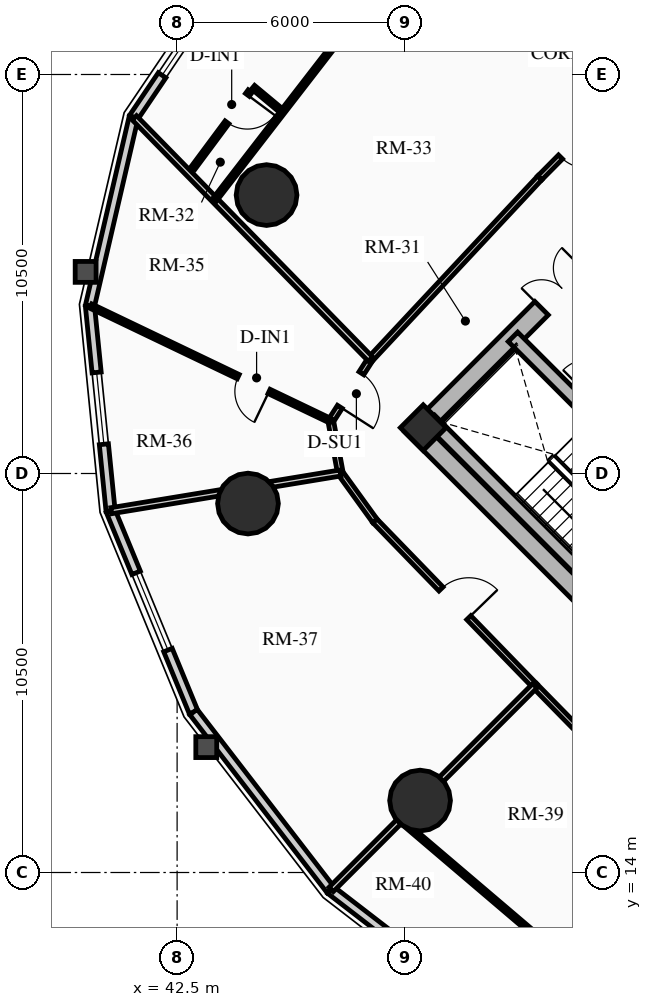
"""IFC4 building model, lengths in metres.
Left out: names, types, materials, properties, quantities, classifications, styles, units other than length and angle.
Written with IfcOpenShell. Run it as: python <this file> out.ifc"""

import sys

from ifc_helpers import new_model, si_unit, direction, frame, frame_2d, origin, origin_2d, place, context, subcontext, project, spatial, rectangle, circle, extrude, source, transform, mapped, element, fill, save


model = new_model("IFC4")
c1 = context("Model", 3, precision=1e-05, world=origin(), true_north=direction((0.0, 1.0)))
c2 = subcontext(c1, "Body", "Model", "MODEL_VIEW")
j1 = project(units=[si_unit("LENGTHUNIT", "METRE"), si_unit("PLANEANGLEUNIT", "RADIAN")], contexts=[c1])
p1 = place(None, origin())
s1 = spatial("IfcSite", under=j1, at=p1, CompositionType="ELEMENT")
p2 = place(p1, origin())
s2 = spatial("IfcBuilding", under=s1, at=p2, CompositionType="ELEMENT")
p3 = place(p2, frame((0.0, 0.0, 45.28)))
s3 = spatial("IfcBuildingStorey", under=s2, at=p3, CompositionType="ELEMENT", Elevation=45.28)
p4 = place(p3, frame((58.773, 15.661, 0.0), z_axis=(0.0, 0.0, 1.0), x_axis=(-0.707106781187, 0.707106781187, 0.0)))
e1 = element("IfcWall", 1, at=p4, inside=s3, PredefinedType="SHEAR", context=c2, shape_type="SweptSolid", body=[
    extrude(rectangle(XDim=14.3, YDim=0.5, at=frame_2d((7.15, 0.0))), origin(), (0.0, 0.0, 1.0), 2.91),
])
p5 = place(p3, frame((48.838, 25.596, 0.0), z_axis=(0.0, 0.0, 1.0), x_axis=(0.707106781187, 0.707106781187, 0.0)))
e2 = element("IfcWall", 2, at=p5, inside=s3, PredefinedType="SHEAR", context=c2, shape_type="SweptSolid", body=[
    extrude(rectangle(XDim=10.7, YDim=0.5, at=frame_2d((5.35, 0.0))), origin(), (0.0, 0.0, 1.0), 2.91),
])
m1 = source(origin(), c2, "Body", "SweptSolid", [
    extrude(rectangle(XDim=1.5, YDim=2.02, at=frame_2d((0.75, 1.01))), frame((0.0, 0.26, 0.0), z_axis=(0.0, -1.0, 0.0), x_axis=(1.0, 0.0, 0.0)), (0.0, 0.0, 1.0), 0.52),
])
p6 = place(p5, frame((4.6, 0.0, 0.0)))
e3 = element("IfcOpeningElement", 3, at=p6, cuts=e2, PredefinedType="OPENING", context=c2, shape_type="MappedRepresentation", body=[
    mapped(m1, transform((0.0, 0.0, 0.0), x_axis=(1.0, 0.0, 0.0), y_axis=(0.0, 1.0, 0.0), z_axis=(0.0, 0.0, 1.0), scale=1.0)),
])
p7 = place(p3, frame((61.096, 18.338, 0.0), z_axis=(0.0, 0.0, 1.0), x_axis=(-0.707106781187, 0.707106781187, 0.0)))
e4 = element("IfcWall", 4, at=p7, inside=s3, PredefinedType="SHEAR", context=c2, shape_type="SweptSolid", body=[
    extrude(rectangle(XDim=13.8, YDim=0.35, at=frame_2d((6.9, 0.0))), origin(), (0.0, 0.0, 1.0), 2.91),
])
m2 = source(origin(), c2, "Body", "SweptSolid", [
    extrude(rectangle(XDim=1.1, YDim=2.015, at=frame_2d((0.55, 1.007))), frame((0.0, 0.185, 0.0), z_axis=(0.0, -1.0, 0.0), x_axis=(1.0, 0.0, 0.0)), (0.0, 0.0, 1.0), 0.37),
])
p8 = place(p7, frame((4.9, 0.0, 0.0)))
e5 = element("IfcOpeningElement", 5, at=p8, cuts=e4, PredefinedType="OPENING", context=c2, shape_type="MappedRepresentation", body=[
    mapped(m2, transform((0.0, 0.0, 0.0), x_axis=(1.0, 0.0, 0.0), y_axis=(0.0, 1.0, 0.0), z_axis=(0.0, 0.0, 1.0), scale=1.0)),
])
m3 = source(origin(), c2, "Body", "SweptSolid", [
    extrude(rectangle(XDim=1.15, YDim=2.02, at=frame_2d((0.575, 1.01))), frame((0.0, 0.185, 0.0), z_axis=(0.0, -1.0, 0.0), x_axis=(1.0, 0.0, 0.0)), (0.0, 0.0, 1.0), 0.37),
])
p9 = place(p7, frame((7.32, 0.0, 0.0)))
e6 = element("IfcOpeningElement", 6, at=p9, cuts=e4, PredefinedType="OPENING", context=c2, shape_type="MappedRepresentation", body=[
    mapped(m3, transform((0.0, 0.0, 0.0), x_axis=(1.0, 0.0, 0.0), y_axis=(0.0, 1.0, 0.0), z_axis=(0.0, 0.0, 1.0), scale=1.0)),
])
p10 = place(p3, frame((53.922, 21.141, 0.0), z_axis=(0.0, 0.0, 1.0), x_axis=(-0.707106781187, 0.707106781187, 0.0)))
e7 = element("IfcWall", 7, at=p10, inside=s3, PredefinedType="SHEAR", context=c2, shape_type="SweptSolid", body=[
    extrude(rectangle(XDim=6.745, YDim=0.35, at=frame_2d((3.373, 0.0))), origin(), (0.0, 0.0, 1.0), 2.91),
])
p11 = place(p3, frame((48.976, 25.706, 0.0), z_axis=(0.0, 0.0, 1.0), x_axis=(0.707106781187, 0.707106781187, 0.0)))
e8 = element("IfcColumn", 8, at=p11, inside=s3, PredefinedType="COLUMN", context=c2, shape_type="SweptSolid", body=[
    extrude(rectangle(XDim=0.85, YDim=0.85, at=origin_2d()), origin(), (0.0, 0.0, 1.0), 2.91),
])
for number, where, z_axis, x_axis in (
    (9, (44.854, 31.827, 0.0), (0.0, 0.0, 1.0), (1.0, 0.0, 0.0)),
    (10, (44.365, 23.709, 0.0), (0.0, 0.0, 1.0), (1.0, 0.0, 0.0)),
    (11, (48.893, 15.893, 0.0), (0.0, 0.0, 1.0), (1.0, 0.0, 0.0)),
):
    element("IfcColumn", number, at=place(p3, frame(where, z_axis=z_axis, x_axis=x_axis)), inside=s3, PredefinedType="USERDEFINED", context=c2, shape_type="SweptSolid", body=[
        extrude(circle(Radius=0.8, at=origin_2d()), origin(), (0.0, 0.0, 1.0), 2.91),
    ])
p12 = place(p3, frame((41.356, 33.871, 0.0), z_axis=(0.0, 0.0, 1.0), x_axis=(0.559621532896, 0.828748297084, 0.0)))
e12 = element("IfcWall", 12, at=p12, inside=s3, PredefinedType="SOLIDWALL", context=c2, shape_type="SweptSolid", body=[
    extrude(rectangle(XDim=4.879, YDim=0.24, at=frame_2d((2.439, 0.0))), origin(), (0.0, 0.0, 1.0), 2.073),
])
m4 = source(origin(), c2, "Body", "SweptSolid", [
    extrude(rectangle(XDim=2.2, YDim=1.35, at=frame_2d((1.1, 0.675))), frame((0.0, 0.13, 0.0), z_axis=(0.0, -1.0, 0.0), x_axis=(1.0, 0.0, 0.0)), (0.0, 0.0, 1.0), 0.26),
])
p13 = place(p12, frame((1.339, 0.0, 0.65)))
e13 = element("IfcOpeningElement", 13, at=p13, cuts=e12, PredefinedType="OPENING", context=c2, shape_type="MappedRepresentation", body=[
    mapped(m4, transform((0.0, 0.0, 0.0), x_axis=(1.0, 0.0, 0.0), y_axis=(0.0, 1.0, 0.0), z_axis=(0.0, 0.0, 1.0), scale=1.0)),
])
p14 = place(p3, frame((40.206, 28.91, 0.0), z_axis=(0.0, 0.0, 1.0), x_axis=(0.22582585901, 0.974167686491, 0.0)))
e14 = element("IfcWall", 14, at=p14, inside=s3, PredefinedType="SOLIDWALL", context=c2, shape_type="SweptSolid", body=[
    extrude(rectangle(XDim=5.092, YDim=0.24, at=frame_2d((2.546, 0.0))), origin(), (0.0, 0.0, 1.0), 2.073),
])
p15 = place(p3, frame((40.749, 23.518, 0.0), z_axis=(0.0, 0.0, 1.0), x_axis=(-0.100190592135, 0.994968263437, 0.0)))
e15 = element("IfcWall", 15, at=p15, inside=s3, PredefinedType="SOLIDWALL", context=c2, shape_type="SweptSolid", body=[
    extrude(rectangle(XDim=5.419, YDim=0.24, at=frame_2d((2.71, 0.0))), origin(), (0.0, 0.0, 1.0), 2.073),
])
m5 = source(origin(), c2, "Body", "SweptSolid", [
    extrude(rectangle(XDim=1.9, YDim=1.35, at=frame_2d((0.95, 0.675))), frame((0.0, 0.13, 0.0), z_axis=(0.0, -1.0, 0.0), x_axis=(1.0, 0.0, 0.0)), (0.0, 0.0, 1.0), 0.26),
])
p16 = place(p15, frame((1.76, 0.0, 0.65)))
e16 = element("IfcOpeningElement", 16, at=p16, cuts=e15, PredefinedType="OPENING", context=c2, shape_type="MappedRepresentation", body=[
    mapped(m5, transform((0.0, 0.0, 0.0), x_axis=(1.0, 0.0, 0.0), y_axis=(0.0, 1.0, 0.0), z_axis=(0.0, 0.0, 1.0), scale=1.0)),
])
p17 = place(p3, frame((42.932, 18.222, 0.0), z_axis=(0.0, 0.0, 1.0), x_axis=(-0.381077764176, 0.924542988536, 0.0)))
e17 = element("IfcWall", 17, at=p17, inside=s3, PredefinedType="SOLIDWALL", context=c2, shape_type="SweptSolid", body=[
    extrude(rectangle(XDim=5.728, YDim=0.24, at=frame_2d((2.864, 0.0))), origin(), (0.0, 0.0, 1.0), 2.073),
])
p18 = place(p17, frame((1.764, 0.0, 0.65)))
e18 = element("IfcOpeningElement", 18, at=p18, cuts=e17, PredefinedType="OPENING", context=c2, shape_type="MappedRepresentation", body=[
    mapped(m4, transform((0.0, 0.0, 0.0), x_axis=(1.0, 0.0, 0.0), y_axis=(0.0, 1.0, 0.0), z_axis=(0.0, 0.0, 1.0), scale=1.0)),
])
p19 = place(p3, frame((46.541, 13.541, 0.0), z_axis=(0.0, 0.0, 1.0), x_axis=(-0.610494906082, 0.792020182601, 0.0)))
e19 = element("IfcWall", 19, at=p19, inside=s3, PredefinedType="SOLIDWALL", context=c2, shape_type="SweptSolid", body=[
    extrude(rectangle(XDim=5.911, YDim=0.24, at=frame_2d((2.956, 0.0))), origin(), (0.0, 0.0, 1.0), 2.073),
])
p20 = place(p3, frame((51.222, 9.932, 0.0), z_axis=(0.0, 0.0, 1.0), x_axis=(-0.792020182601, 0.610494906082, 0.0)))
e20 = element("IfcWall", 20, at=p20, inside=s3, PredefinedType="SOLIDWALL", context=c2, shape_type="SweptSolid", body=[
    extrude(rectangle(XDim=5.911, YDim=0.24, at=frame_2d((2.956, 0.0))), origin(), (0.0, 0.0, 1.0), 2.073),
])
p21 = place(p20, frame((2.005, 0.0, 0.65)))
e21 = element("IfcOpeningElement", 21, at=p21, cuts=e20, PredefinedType="OPENING", context=c2, shape_type="MappedRepresentation", body=[
    mapped(m5, transform((0.0, 0.0, 0.0), x_axis=(1.0, 0.0, 0.0), y_axis=(0.0, 1.0, 0.0), z_axis=(0.0, 0.0, 1.0), scale=1.0)),
])
p22 = place(p3, frame((54.427, 34.683, 0.0), z_axis=(0.0, 0.0, 1.0), x_axis=(-0.704178989986, -0.710022499687, 0.0)))
e22 = element("IfcWall", 22, at=p22, inside=s3, PredefinedType="PARTITIONING", context=c2, shape_type="SweptSolid", body=[
    extrude(rectangle(XDim=3.384, YDim=0.15, at=frame_2d((1.692, 0.0))), origin(), (0.0, 0.0, 1.0), 2.159),
])
m6 = source(origin(), c2, "Body", "SweptSolid", [
    extrude(rectangle(XDim=1.05, YDim=2.015, at=frame_2d((0.525, 1.007))), frame((0.0, 0.085, 0.0), z_axis=(0.0, -1.0, 0.0), x_axis=(1.0, 0.0, 0.0)), (0.0, 0.0, 1.0), 0.17),
])
p23 = place(p22, frame((1.56, 0.0, 0.0)))
e23 = element("IfcOpeningElement", 23, at=p23, cuts=e22, PredefinedType="OPENING", context=c2, shape_type="MappedRepresentation", body=[
    mapped(m6, transform((0.0, 0.0, 0.0), x_axis=(1.0, 0.0, 0.0), y_axis=(0.0, 1.0, 0.0), z_axis=(0.0, 0.0, 1.0), scale=1.0)),
])
p24 = place(p3, frame((52.043, 32.28, 0.0), z_axis=(0.0, 0.0, 1.0), x_axis=(-0.682606081633, -0.730786519661, 0.0)))
e24 = element("IfcWall", 24, at=p24, inside=s3, PredefinedType="PARTITIONING", context=c2, shape_type="SweptSolid", body=[
    extrude(rectangle(XDim=6.527, YDim=0.15, at=frame_2d((3.263, 0.0))), origin(), (0.0, 0.0, 1.0), 2.159),
])
p25 = place(p3, frame((47.588, 27.51, 0.0), z_axis=(0.0, 0.0, 1.0), x_axis=(-0.540202619347, -0.841534984449, 0.0)))
e25 = element("IfcWall", 25, at=p25, inside=s3, PredefinedType="PARTITIONING", context=c2, shape_type="SweptSolid", body=[
    extrude(rectangle(XDim=1.935, YDim=0.15, at=frame_2d((0.967, 0.0))), origin(), (0.0, 0.0, 1.0), 2.159),
])
p26 = place(p25, frame((0.442, 0.0, 0.0)))
e26 = element("IfcOpeningElement", 26, at=p26, cuts=e25, PredefinedType="OPENING", context=c2, shape_type="MappedRepresentation", body=[
    mapped(m6, transform((0.0, 0.0, 0.0), x_axis=(1.0, 0.0, 0.0), y_axis=(0.0, 1.0, 0.0), z_axis=(0.0, 0.0, 1.0), scale=1.0)),
])
p27 = place(p3, frame((46.543, 25.882, 0.0), z_axis=(0.0, 0.0, 1.0), x_axis=(0.181153502579, -0.983454832976, 0.0)))
e27 = element("IfcWall", 27, at=p27, inside=s3, PredefinedType="PARTITIONING", context=c2, shape_type="SweptSolid", body=[
    extrude(rectangle(XDim=1.392, YDim=0.15, at=frame_2d((0.696, 0.0))), origin(), (0.0, 0.0, 1.0), 2.159),
])
p28 = place(p3, frame((46.795, 24.513, 0.0), z_axis=(0.0, 0.0, 1.0), x_axis=(0.585628197524, -0.810579801294, 0.0)))
e28 = element("IfcWall", 28, at=p28, inside=s3, PredefinedType="PARTITIONING", context=c2, shape_type="SweptSolid", body=[
    extrude(rectangle(XDim=1.554, YDim=0.15, at=frame_2d((0.777, 0.0))), origin(), (0.0, 0.0, 1.0), 2.205),
])
p29 = place(p3, frame((47.706, 23.253, 0.0), z_axis=(0.0, 0.0, 1.0), x_axis=(0.696179266346, -0.717867974707, 0.0)))
e29 = element("IfcWall", 29, at=p29, inside=s3, PredefinedType="PARTITIONING", context=c2, shape_type="SweptSolid", body=[
    extrude(rectangle(XDim=6.045, YDim=0.15, at=frame_2d((3.022, 0.0))), origin(), (0.0, 0.0, 1.0), 2.635),
])
p30 = place(p29, frame((2.497, 0.0, 0.0)))
e30 = element("IfcOpeningElement", 30, at=p30, cuts=e29, PredefinedType="OPENING", context=c2, shape_type="MappedRepresentation", body=[
    mapped(m6, transform((0.0, 0.0, 0.0), x_axis=(1.0, 0.0, 0.0), y_axis=(0.0, 1.0, 0.0), z_axis=(0.0, 0.0, 1.0), scale=1.0)),
])
p31 = place(p3, frame((51.914, 18.914, 0.0), z_axis=(0.0, 0.0, 1.0), x_axis=(0.699999313799, -0.714143515465, 0.0)))
e31 = element("IfcWall", 31, at=p31, inside=s3, PredefinedType="PARTITIONING", context=c2, shape_type="SweptSolid", body=[
    extrude(rectangle(XDim=6.162, YDim=0.15, at=frame_2d((3.081, 0.0))), origin(), (0.0, 0.0, 1.0), 2.159),
])
p32 = place(p3, frame((47.588, 27.51, 0.0), z_axis=(0.0, 0.0, 1.0), x_axis=(-0.699371977892, 0.714757886657, 0.0)))
e32 = element("IfcWall", 32, at=p32, inside=s3, PredefinedType="PARTITIONING", context=c2, shape_type="SweptSolid", body=[
    extrude(rectangle(XDim=8.886, YDim=0.16, at=frame_2d((4.443, 0.0))), origin(), (0.0, 0.0, 1.0), 2.073),
])
p33 = place(p3, frame((46.795, 24.513, 0.0), z_axis=(0.0, 0.0, 1.0), x_axis=(-0.986729986004, -0.162369746937, 0.0)))
e33 = element("IfcWall", 33, at=p33, inside=s3, PredefinedType="PARTITIONING", context=c2, shape_type="SweptSolid", body=[
    extrude(rectangle(XDim=6.108, YDim=0.16, at=frame_2d((3.054, 0.0))), origin(), (0.0, 0.0, 1.0), 2.073),
])
p34 = place(p3, frame((51.914, 18.914, 0.0), z_axis=(0.0, 0.0, 1.0), x_axis=(-0.707106781187, -0.707106781187, 0.0)))
e34 = element("IfcWall", 34, at=p34, inside=s3, PredefinedType="PARTITIONING", context=c2, shape_type="SweptSolid", body=[
    extrude(rectangle(XDim=7.579, YDim=0.16, at=frame_2d((3.79, 0.0))), origin(), (0.0, 0.0, 1.0), 2.073),
])
p35 = place(p3, frame((46.801, 35.989, 0.0), z_axis=(0.0, 0.0, 1.0), x_axis=(-0.611635984749, -0.791139319058, 0.0)))
e35 = element("IfcWall", 35, at=p35, inside=s3, PredefinedType="PARTITIONING", context=c2, shape_type="SweptSolid", body=[
    extrude(rectangle(XDim=5.419, YDim=0.125, at=frame_2d((2.709, 0.0))), origin(), (0.0, 0.0, 1.0), 2.159),
])
p36 = place(p3, frame((45.204, 34.078, 0.0), z_axis=(0.0, 0.0, 1.0), x_axis=(-0.768330339969, 0.640053504547, 0.0)))
e36 = element("IfcWall", 36, at=p36, inside=s3, PredefinedType="PARTITIONING", context=c2, shape_type="SweptSolid", body=[
    extrude(rectangle(XDim=0.917, YDim=0.125, at=frame_2d((0.458, 0.0))), origin(), (0.0, 0.0, 1.0), 2.635),
])
p37 = place(p3, frame((44.421, 34.56, 0.0), z_axis=(0.0, 0.0, 1.0), x_axis=(-0.596454407051, -0.802646958699, 0.0)))
e37 = element("IfcWall", 37, at=p37, inside=s3, PredefinedType="PARTITIONING", context=c2, shape_type="SweptSolid", body=[
    extrude(rectangle(XDim=2.516, YDim=0.125, at=frame_2d((1.258, 0.0))), origin(), (0.0, 0.0, 1.0), 2.159),
])
m7 = source(origin(), c2, "Body", "SweptSolid", [
    extrude(rectangle(XDim=0.9, YDim=2.005, at=frame_2d((0.45, 1.002))), frame((0.0, 0.073, 0.0), z_axis=(0.0, -1.0, 0.0), x_axis=(1.0, 0.0, 0.0)), (0.0, 0.0, 1.0), 0.145),
])
p38 = place(p37, frame((0.12, 0.0, 0.0)))
e38 = element("IfcOpeningElement", 38, at=p38, cuts=e37, PredefinedType="OPENING", context=c2, shape_type="MappedRepresentation", body=[
    mapped(m7, transform((0.0, 0.0, 0.0), x_axis=(1.0, 0.0, 0.0), y_axis=(0.0, 1.0, 0.0), z_axis=(0.0, 0.0, 1.0), scale=1.0)),
])
p39 = place(p3, frame((46.543, 25.882, 0.0), z_axis=(0.0, 0.0, 1.0), x_axis=(-0.901937110034, 0.431867398103, 0.0)))
e39 = element("IfcWall", 39, at=p39, inside=s3, PredefinedType="PARTITIONING", context=c2, shape_type="SweptSolid", body=[
    extrude(rectangle(XDim=7.004, YDim=0.125, at=frame_2d((3.502, 0.0))), origin(), (0.0, 0.0, 1.0), 2.073),
])
p40 = place(p39, frame((1.8, 0.0, 0.0)))
e40 = element("IfcOpeningElement", 40, at=p40, cuts=e39, PredefinedType="OPENING", context=c2, shape_type="MappedRepresentation", body=[
    mapped(m7, transform((0.0, 0.0, 0.0), x_axis=(1.0, 0.0, 0.0), y_axis=(0.0, 1.0, 0.0), z_axis=(0.0, 0.0, 1.0), scale=1.0)),
])
p41 = place(p3, frame((48.377, 15.377, 0.0), z_axis=(0.0, 0.0, 1.0), x_axis=(0.761505943152, -0.648157927163, 0.0)))
e41 = element("IfcWall", 41, at=p41, inside=s3, PredefinedType="PARTITIONING", context=c2, shape_type="SweptSolid", body=[
    extrude(rectangle(XDim=5.979, YDim=0.125, at=frame_2d((2.99, 0.0))), origin(), (0.0, 0.0, 1.0), 2.635),
])
m8 = source(origin(), c2, "Body", "SweptSolid", [
    extrude(rectangle(XDim=2.2, YDim=1.35, at=frame_2d((1.1, 0.675))), frame((0.0, 0.03, 0.0), z_axis=(0.0, -1.0, 0.0), x_axis=(1.0, 0.0, 0.0)), (0.0, 0.0, 1.0), 0.06),
])
p42 = place(p13, origin())
e42 = element("IfcWindow", 42, at=p42, inside=s3, PartitioningType="DOUBLE_PANEL_VERTICAL", PredefinedType="WINDOW", context=c2, shape_type="MappedRepresentation", body=[
    mapped(m8, transform((0.0, 0.0, 0.0), x_axis=(1.0, 0.0, 0.0), y_axis=(0.0, 1.0, 0.0), z_axis=(0.0, 0.0, 1.0), scale=1.0)),
])
fill(e13, e42)
m9 = source(origin(), c2, "Body", "SweptSolid", [
    extrude(rectangle(XDim=1.9, YDim=1.35, at=frame_2d((0.95, 0.675))), frame((0.0, 0.03, 0.0), z_axis=(0.0, -1.0, 0.0), x_axis=(1.0, 0.0, 0.0)), (0.0, 0.0, 1.0), 0.06),
])
p43 = place(p16, origin())
e43 = element("IfcWindow", 43, at=p43, inside=s3, PartitioningType="DOUBLE_PANEL_VERTICAL", PredefinedType="WINDOW", context=c2, shape_type="MappedRepresentation", body=[
    mapped(m9, transform((0.0, 0.0, 0.0), x_axis=(1.0, 0.0, 0.0), y_axis=(0.0, 1.0, 0.0), z_axis=(0.0, 0.0, 1.0), scale=1.0)),
])
fill(e16, e43)
p44 = place(p18, origin())
e44 = element("IfcWindow", 44, at=p44, inside=s3, PartitioningType="DOUBLE_PANEL_VERTICAL", PredefinedType="WINDOW", context=c2, shape_type="MappedRepresentation", body=[
    mapped(m8, transform((0.0, 0.0, 0.0), x_axis=(1.0, 0.0, 0.0), y_axis=(0.0, 1.0, 0.0), z_axis=(0.0, 0.0, 1.0), scale=1.0)),
])
fill(e18, e44)
m10 = source(origin(), c2, "Body", "SweptSolid", [
    extrude(rectangle(XDim=1.5, YDim=2.02, at=frame_2d((0.75, 1.01))), frame((0.0, 0.025, 0.0), z_axis=(0.0, -1.0, 0.0), x_axis=(1.0, 0.0, 0.0)), (0.0, 0.0, 1.0), 0.05),
])
p45 = place(p6, origin())
e45 = element("IfcDoor", 45, at=p45, inside=s3, OperationType="DOUBLE_DOOR_SINGLE_SWING", PredefinedType="DOOR", context=c2, shape_type="MappedRepresentation", body=[
    mapped(m10, transform((0.0, 0.0, 0.0), x_axis=(1.0, 0.0, 0.0), y_axis=(0.0, 1.0, 0.0), z_axis=(0.0, 0.0, 1.0), scale=1.0)),
])
fill(e3, e45)
m11 = source(origin(), c2, "Body", "SweptSolid", [
    extrude(rectangle(XDim=1.05, YDim=2.015, at=frame_2d((0.525, 1.007))), frame((0.0, 0.025, 0.0), z_axis=(0.0, -1.0, 0.0), x_axis=(1.0, 0.0, 0.0)), (0.0, 0.0, 1.0), 0.05),
])
p46 = place(p23, origin())
e46 = element("IfcDoor", 46, at=p46, inside=s3, OperationType="SINGLE_SWING_LEFT", PredefinedType="DOOR", context=c2, shape_type="MappedRepresentation", body=[
    mapped(m11, transform((0.0, 0.0, 0.0), x_axis=(1.0, 0.0, 0.0), y_axis=(0.0, 1.0, 0.0), z_axis=(0.0, 0.0, 1.0), scale=1.0)),
])
fill(e23, e46)
m12 = source(origin(), c2, "Body", "SweptSolid", [
    extrude(rectangle(XDim=0.9, YDim=2.005, at=frame_2d((0.45, 1.002))), frame((0.0, 0.025, 0.0), z_axis=(0.0, -1.0, 0.0), x_axis=(1.0, 0.0, 0.0)), (0.0, 0.0, 1.0), 0.05),
])
p47 = place(p38, origin())
e47 = element("IfcDoor", 47, at=p47, inside=s3, OperationType="SINGLE_SWING_LEFT", PredefinedType="DOOR", context=c2, shape_type="MappedRepresentation", body=[
    mapped(m12, transform((0.0, 0.0, 0.0), x_axis=(1.0, 0.0, 0.0), y_axis=(0.0, 1.0, 0.0), z_axis=(0.0, 0.0, 1.0), scale=1.0)),
])
fill(e38, e47)
p48 = place(p26, origin())
e48 = element("IfcDoor", 48, at=p48, inside=s3, OperationType="SINGLE_SWING_RIGHT", PredefinedType="DOOR", context=c2, shape_type="MappedRepresentation", body=[
    mapped(m11, transform((0.0, 0.0, 0.0), x_axis=(1.0, 0.0, 0.0), y_axis=(0.0, 1.0, 0.0), z_axis=(0.0, 0.0, 1.0), scale=1.0)),
])
fill(e26, e48)
p49 = place(p40, origin())
e49 = element("IfcDoor", 49, at=p49, inside=s3, OperationType="SINGLE_SWING_LEFT", PredefinedType="DOOR", context=c2, shape_type="MappedRepresentation", body=[
    mapped(m12, transform((0.0, 0.0, 0.0), x_axis=(1.0, 0.0, 0.0), y_axis=(0.0, 1.0, 0.0), z_axis=(0.0, 0.0, 1.0), scale=1.0)),
])
fill(e40, e49)
p50 = place(p30, origin())
e50 = element("IfcDoor", 50, at=p50, inside=s3, OperationType="SINGLE_SWING_RIGHT", PredefinedType="DOOR", context=c2, shape_type="MappedRepresentation", body=[
    mapped(m11, transform((0.0, 0.0, 0.0), x_axis=(1.0, 0.0, 0.0), y_axis=(0.0, 1.0, 0.0), z_axis=(0.0, 0.0, 1.0), scale=1.0)),
])
fill(e30, e50)
save(model, sys.argv[1])
